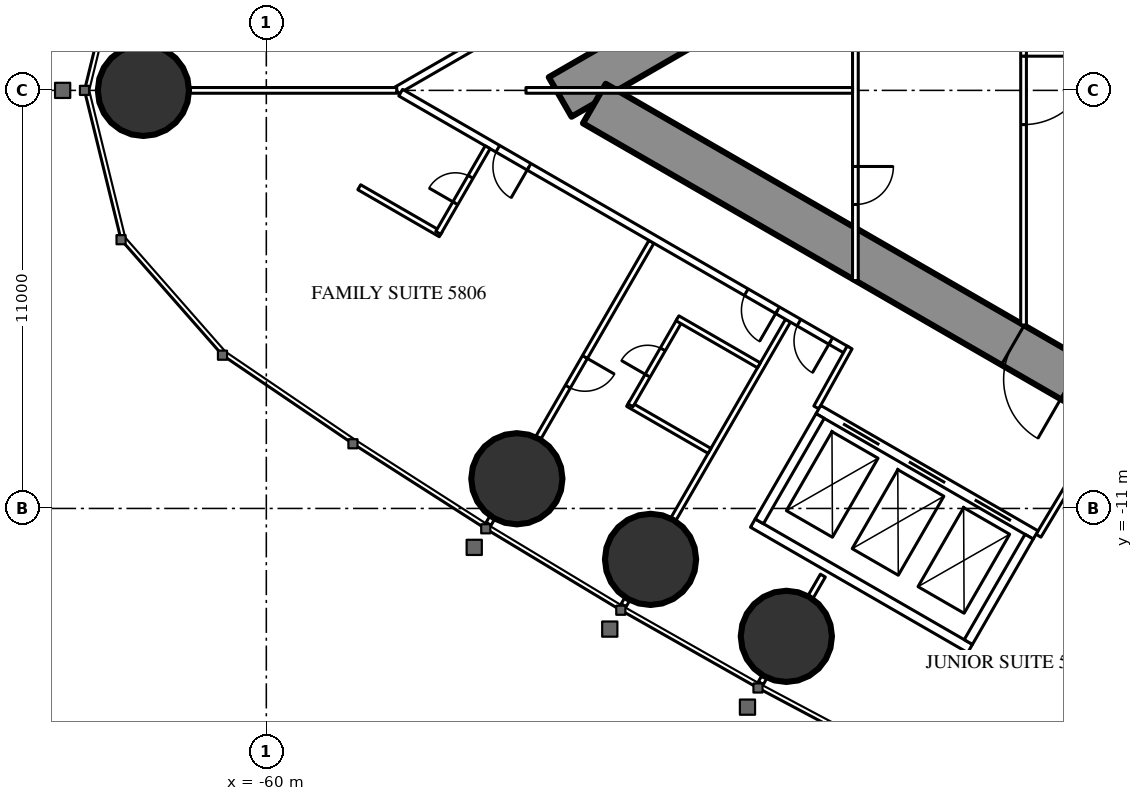
"""IFC4 building model, lengths in metres.
Left out: names, types, materials, properties, quantities, classifications, styles, units other than length and angle.
Written with IfcOpenShell. Run it as: python <this file> out.ifc"""

import sys

from ifc_helpers import new_model, si_unit, direction, frame, frame_2d, origin, origin_2d, place, context, subcontext, project, spatial, rectangle, circle, extrude, element, fill, save


model = new_model("IFC4")
c1 = context("Model", 3, precision=1e-05, world=origin(), true_north=direction((0.0, 1.0)))
c2 = subcontext(c1, "Body", "Model", "MODEL_VIEW")
j1 = project(units=[si_unit("LENGTHUNIT", "METRE"), si_unit("PLANEANGLEUNIT", "RADIAN")], contexts=[c1])
p1 = place(None, origin())
s1 = spatial("IfcSite", under=j1, at=p1, CompositionType="ELEMENT")
p2 = place(p1, origin())
s2 = spatial("IfcBuilding", under=s1, at=p2, CompositionType="ELEMENT")
p3 = place(p2, frame((0.0, 0.0, 218.9)))
s3 = spatial("IfcBuildingStorey", under=s2, at=p3, CompositionType="ELEMENT", Elevation=218.9)
for number, where, z_axis, x_axis in (
    (1, (-63.234, 0.0, 0.0), (0.0, 0.0, 1.0), (1.0, 0.0, 0.0)),
    (2, (-53.408, -10.219, 0.0), (0.0, 0.0, 1.0), (1.0, 0.0, 0.0)),
    (3, (-49.89, -12.34, 0.0), (0.0, 0.0, 1.0), (1.0, 0.0, 0.0)),
    (4, (-46.317, -14.365, 0.0), (0.0, 0.0, 1.0), (1.0, 0.0, 0.0)),
):
    element("IfcColumn", number, at=place(p3, frame(where, z_axis=z_axis, x_axis=x_axis)), inside=s3, PredefinedType="COLUMN", context=c2, shape_type="SweptSolid", body=[
        extrude(circle(Radius=1.2, at=origin_2d()), origin(), (0.0, 0.0, 1.0), 3.6),
    ])
p4 = place(p3, frame((-27.2, 14.3, 0.0), z_axis=(0.0, 0.0, 1.0), x_axis=(-0.866026593062, -0.499997940104, 0.0)))
e5 = element("IfcWall", 5, at=p4, inside=s3, PredefinedType="SHEAR", context=c2, shape_type="SweptSolid", body=[
    extrude(rectangle(XDim=28.946, YDim=1.2, at=frame_2d((14.473, 0.0))), origin(), (0.0, 0.0, 1.0), 3.6),
])
p5 = place(p4, frame((4.6, 0.0, 0.0)))
e6 = element("IfcOpeningElement", 6, at=p5, cuts=e5, PredefinedType="OPENING", context=c2, shape_type="SweptSolid", body=[
    extrude(rectangle(XDim=1.0, YDim=2.2, at=frame_2d((0.5, 1.1))), frame((0.0, 0.61, 0.0), z_axis=(0.0, -1.0, 0.0), x_axis=(1.0, 0.0, 0.0)), (0.0, 0.0, 1.0), 1.22),
])
p6 = place(p4, frame((13.395, 0.0, 0.0)))
e7 = element("IfcOpeningElement", 7, at=p6, cuts=e5, PredefinedType="OPENING", context=c2, shape_type="SweptSolid", body=[
    extrude(rectangle(XDim=1.8, YDim=2.2, at=frame_2d((0.9, 1.1))), frame((0.0, 0.61, 0.0), z_axis=(0.0, -1.0, 0.0), x_axis=(1.0, 0.0, 0.0)), (0.0, 0.0, 1.0), 1.22),
])
p7 = place(p3, frame((-27.2, -14.3, 0.0), z_axis=(0.0, 0.0, 1.0), x_axis=(-0.866024021859, 0.500002393557, 0.0)))
e8 = element("IfcWall", 8, at=p7, inside=s3, PredefinedType="SHEAR", context=c2, shape_type="SweptSolid", body=[
    extrude(rectangle(XDim=27.907, YDim=1.2, at=frame_2d((13.954, 0.0))), origin(), (0.0, 0.0, 1.0), 3.6),
])
p8 = place(p7, frame((4.6, 0.0, 0.0)))
e9 = element("IfcOpeningElement", 9, at=p8, cuts=e8, PredefinedType="OPENING", context=c2, shape_type="SweptSolid", body=[
    extrude(rectangle(XDim=1.0, YDim=2.2, at=frame_2d((0.5, 1.1))), frame((0.0, 0.61, 0.0), z_axis=(0.0, -1.0, 0.0), x_axis=(1.0, 0.0, 0.0)), (0.0, 0.0, 1.0), 1.22),
])
p9 = place(p7, frame((13.395, 0.0, 0.0)))
e10 = element("IfcOpeningElement", 10, at=p9, cuts=e8, PredefinedType="OPENING", context=c2, shape_type="SweptSolid", body=[
    extrude(rectangle(XDim=1.8, YDim=2.2, at=frame_2d((0.9, 1.1))), frame((0.0, 0.61, 0.0), z_axis=(0.0, -1.0, 0.0), x_axis=(1.0, 0.0, 0.0)), (0.0, 0.0, 1.0), 1.22),
])
p10 = place(p3, frame((-28.737, 16.068, 0.0), z_axis=(0.0, 0.0, 1.0), x_axis=(-0.866026057212, -0.499998868229, 0.0)))
e11 = element("IfcWall", 11, at=p10, inside=s3, PredefinedType="PARTITIONING", context=c2, shape_type="SweptSolid", body=[
    extrude(rectangle(XDim=32.137, YDim=0.2, at=frame_2d((16.068, 0.0))), origin(), (0.0, 0.0, 1.0), 3.35),
])
p11 = place(p10, frame((1.08, 0.0, 0.0)))
e12 = element("IfcOpeningElement", 12, at=p11, cuts=e11, PredefinedType="OPENING", context=c2, shape_type="SweptSolid", body=[
    extrude(rectangle(XDim=1.8, YDim=2.03, at=frame_2d((0.9, 1.015))), frame((0.0, 0.11, 0.0), z_axis=(0.0, -1.0, 0.0), x_axis=(1.0, 0.0, 0.0)), (0.0, 0.0, 1.0), 0.22),
])
p12 = place(p10, frame((6.86, 0.0, 0.0)))
e13 = element("IfcOpeningElement", 13, at=p12, cuts=e11, PredefinedType="OPENING", context=c2, shape_type="SweptSolid", body=[
    extrude(rectangle(XDim=1.0, YDim=2.2, at=frame_2d((0.5, 1.1))), frame((0.0, 0.11, 0.0), z_axis=(0.0, -1.0, 0.0), x_axis=(1.0, 0.0, 0.0)), (0.0, 0.0, 1.0), 0.22),
])
p13 = place(p10, frame((16.418, 0.0, 0.0)))
e14 = element("IfcOpeningElement", 14, at=p13, cuts=e11, PredefinedType="OPENING", context=c2, shape_type="SweptSolid", body=[
    extrude(rectangle(XDim=0.95, YDim=2.2, at=frame_2d((0.475, 1.1))), frame((0.0, 0.11, 0.0), z_axis=(0.0, -1.0, 0.0), x_axis=(1.0, 0.0, 0.0)), (0.0, 0.0, 1.0), 0.22),
])
p14 = place(p10, frame((20.567, 0.0, 0.0)))
e15 = element("IfcOpeningElement", 15, at=p14, cuts=e11, PredefinedType="OPENING", context=c2, shape_type="SweptSolid", body=[
    extrude(rectangle(XDim=0.95, YDim=2.2, at=frame_2d((0.475, 1.1))), frame((0.0, 0.11, 0.0), z_axis=(0.0, -1.0, 0.0), x_axis=(1.0, 0.0, 0.0)), (0.0, 0.0, 1.0), 0.22),
])
p15 = place(p10, frame((27.065, 0.0, 0.0)))
e16 = element("IfcOpeningElement", 16, at=p15, cuts=e11, PredefinedType="OPENING", context=c2, shape_type="SweptSolid", body=[
    extrude(rectangle(XDim=0.95, YDim=2.2, at=frame_2d((0.475, 1.1))), frame((0.0, 0.11, 0.0), z_axis=(0.0, -1.0, 0.0), x_axis=(1.0, 0.0, 0.0)), (0.0, 0.0, 1.0), 0.22),
])
p16 = place(p3, frame((-46.898, -15.439, 0.0), z_axis=(0.0, 0.0, 1.0), x_axis=(-0.500232303069, -0.865891241997, 0.0)))
e17 = element("IfcWall", 17, at=p16, inside=s3, PredefinedType="PARTITIONING", context=c2, shape_type="SweptSolid", body=[
    extrude(rectangle(XDim=0.18, YDim=0.15, at=frame_2d((0.09, 0.0))), origin(), (0.0, 0.0, 1.0), 2.45),
])
p17 = place(p3, frame((-46.274, -6.059, 0.0), z_axis=(0.0, 0.0, 1.0), x_axis=(-0.500020471368, -0.866013584312, 0.0)))
e18 = element("IfcWall", 18, at=p17, inside=s3, PredefinedType="PARTITIONING", context=c2, shape_type="SweptSolid", body=[
    extrude(rectangle(XDim=6.028, YDim=0.15, at=frame_2d((3.014, 0.0))), origin(), (0.0, 0.0, 1.0), 2.45),
])
p18 = place(p3, frame((-50.508, -13.392, 0.0), z_axis=(0.0, 0.0, 1.0), x_axis=(-0.499644091975, -0.866230789891, 0.0)))
e19 = element("IfcWall", 19, at=p18, inside=s3, PredefinedType="PARTITIONING", context=c2, shape_type="SweptSolid", body=[
    extrude(rectangle(XDim=0.18, YDim=0.15, at=frame_2d((0.09, 0.0))), origin(), (0.0, 0.0, 1.0), 2.45),
])
p19 = place(p3, frame((-49.866, -3.985, 0.0), z_axis=(0.0, 0.0, 1.0), x_axis=(-0.500000694566, -0.866025002776, 0.0)))
e20 = element("IfcWall", 20, at=p19, inside=s3, PredefinedType="PARTITIONING", context=c2, shape_type="SweptSolid", body=[
    extrude(rectangle(XDim=5.95, YDim=0.15, at=frame_2d((2.975, 0.0))), origin(), (0.0, 0.0, 1.0), 2.45),
])
p20 = place(p19, frame((3.5, 0.0, 0.0)))
e21 = element("IfcOpeningElement", 21, at=p20, cuts=e20, PredefinedType="OPENING", context=c2, shape_type="SweptSolid", body=[
    extrude(rectangle(XDim=0.9, YDim=2.2, at=frame_2d((0.45, 1.1))), frame((0.0, 0.085, 0.0), z_axis=(0.0, -1.0, 0.0), x_axis=(1.0, 0.0, 0.0)), (0.0, 0.0, 1.0), 0.17),
])
p21 = place(p3, frame((-54.061, -11.25, 0.0), z_axis=(0.0, 0.0, 1.0), x_axis=(-0.500391173478, -0.865799441849, 0.0)))
e22 = element("IfcWall", 22, at=p21, inside=s3, PredefinedType="PARTITIONING", context=c2, shape_type="SweptSolid", body=[
    extrude(rectangle(XDim=0.179, YDim=0.15, at=frame_2d((0.089, 0.0))), origin(), (0.0, 0.0, 1.0), 2.45),
])
p22 = place(p3, frame((-56.568, 0.0, 0.0), z_axis=(0.0, 0.0, 1.0), x_axis=(-1.0, 0.0, 0.0)))
e23 = element("IfcWall", 23, at=p22, inside=s3, PredefinedType="PARTITIONING", context=c2, shape_type="SweptSolid", body=[
    extrude(rectangle(XDim=5.446, YDim=0.15, at=frame_2d((2.723, 0.0))), origin(), (0.0, 0.0, 1.0), 2.45),
])
p23 = place(p3, frame((-45.356, -12.767, 0.0), z_axis=(0.0, 0.0, 1.0), x_axis=(-0.499886366516, -0.866091000168, 0.0)))
e24 = element("IfcWall", 24, at=p23, inside=s3, PredefinedType="PARTITIONING", context=c2, shape_type="SweptSolid", body=[
    extrude(rectangle(XDim=0.645, YDim=0.15, at=frame_2d((0.322, 0.0))), origin(), (0.0, 0.0, 1.0), 3.35),
])
p24 = place(p3, frame((-44.715, -6.844, 0.0), z_axis=(0.0, 0.0, 1.0), x_axis=(-0.866025261224, 0.500000246922, 0.0)))
e25 = element("IfcWall", 25, at=p24, inside=s3, PredefinedType="PARTITIONING", context=c2, shape_type="SweptSolid", body=[
    extrude(rectangle(XDim=13.567, YDim=0.2, at=frame_2d((6.783, 0.0))), origin(), (0.0, 0.0, 1.0), 3.35),
])
p25 = place(p24, frame((9.667, 0.0, 0.0)))
e26 = element("IfcOpeningElement", 26, at=p25, cuts=e25, PredefinedType="OPENING", context=c2, shape_type="SweptSolid", body=[
    extrude(rectangle(XDim=0.95, YDim=2.2, at=frame_2d((0.475, 1.1))), frame((0.0, 0.11, 0.0), z_axis=(0.0, -1.0, 0.0), x_axis=(1.0, 0.0, 0.0)), (0.0, 0.0, 1.0), 0.22),
])
p26 = place(p24, frame((2.117, 0.0, 0.0)))
e27 = element("IfcOpeningElement", 27, at=p26, cuts=e25, PredefinedType="OPENING", context=c2, shape_type="SweptSolid", body=[
    extrude(rectangle(XDim=0.95, YDim=2.2, at=frame_2d((0.475, 1.1))), frame((0.0, 0.11, 0.0), z_axis=(0.0, -1.0, 0.0), x_axis=(1.0, 0.0, 0.0)), (0.0, 0.0, 1.0), 0.22),
])
p27 = place(p24, frame((0.5, 0.0, 0.0)))
e28 = element("IfcOpeningElement", 28, at=p27, cuts=e25, PredefinedType="OPENING", context=c2, shape_type="SweptSolid", body=[
    extrude(rectangle(XDim=0.967, YDim=2.2, at=frame_2d((0.483, 1.1))), frame((0.0, 0.11, 0.0), z_axis=(0.0, -1.0, 0.0), x_axis=(1.0, 0.0, 0.0)), (0.0, 0.0, 1.0), 0.22),
])
for number, where, z_axis, x_axis in (
    (29, (-39.683, -11.718, 0.0), (0.0, 0.0, 1.0), (0.514, 0.858, 0.0)),
    (30, (-44.652, -6.764, 0.0), (0.0, 0.0, 1.0), (-0.485, -0.874, 0.0)),
):
    element("IfcWall", number, at=place(p3, frame(where, z_axis=z_axis, x_axis=x_axis)), inside=s3, PredefinedType="PARTITIONING", context=c2, shape_type="SweptSolid", body=[
        extrude(rectangle(XDim=1.805, YDim=0.15, at=frame_2d((0.903, 0.0))), origin(), (0.0, 0.0, 1.0), 3.35),
    ])
p28 = place(p3, frame((-55.411, -3.786, 0.0), z_axis=(0.0, 0.0, 1.0), x_axis=(-0.866006523861, 0.500032699561, 0.0)))
e31 = element("IfcWall", 31, at=p28, inside=s3, PredefinedType="PARTITIONING", context=c2, shape_type="SweptSolid", body=[
    extrude(rectangle(XDim=2.475, YDim=0.15, at=frame_2d((1.237, 0.0))), origin(), (0.0, 0.0, 1.0), 3.35),
])
p29 = place(p3, frame((-54.176, -1.497, 0.0), z_axis=(0.0, 0.0, 1.0), x_axis=(-0.500006934395, -0.866021400173, 0.0)))
e32 = element("IfcWall", 32, at=p29, inside=s3, PredefinedType="PARTITIONING", context=c2, shape_type="SweptSolid", body=[
    extrude(rectangle(XDim=2.6, YDim=0.15, at=frame_2d((1.3, 0.0))), origin(), (0.0, 0.0, 1.0), 3.35),
])
p30 = place(p29, frame((0.9, 0.0, 0.0)))
e33 = element("IfcOpeningElement", 33, at=p30, cuts=e32, PredefinedType="OPENING", context=c2, shape_type="SweptSolid", body=[
    extrude(rectangle(XDim=0.8, YDim=2.2, at=frame_2d((0.4, 1.1))), frame((0.0, 0.085, 0.0), z_axis=(0.0, -1.0, 0.0), x_axis=(1.0, 0.0, 0.0)), (0.0, 0.0, 1.0), 0.17),
])
p31 = place(p3, frame((-48.339, -9.486, 0.0), z_axis=(0.0, 0.0, 1.0), x_axis=(-0.866006523861, 0.500032699561, 0.0)))
e34 = element("IfcWall", 34, at=p31, inside=s3, PredefinedType="PARTITIONING", context=c2, shape_type="SweptSolid", body=[
    extrude(rectangle(XDim=2.475, YDim=0.15, at=frame_2d((1.237, 0.0))), origin(), (0.0, 0.0, 1.0), 3.35),
])
p32 = place(p3, frame((-49.117, -6.034, 0.0), z_axis=(0.0, 0.0, 1.0), x_axis=(-0.500006934395, -0.866021400173, 0.0)))
e35 = element("IfcWall", 35, at=p32, inside=s3, PredefinedType="PARTITIONING", context=c2, shape_type="SweptSolid", body=[
    extrude(rectangle(XDim=2.6, YDim=0.15, at=frame_2d((1.3, 0.0))), origin(), (0.0, 0.0, 1.0), 3.35),
])
p33 = place(p32, frame((0.9, 0.0, 0.0)))
e36 = element("IfcOpeningElement", 36, at=p33, cuts=e35, PredefinedType="OPENING", context=c2, shape_type="SweptSolid", body=[
    extrude(rectangle(XDim=0.8, YDim=2.2, at=frame_2d((0.4, 1.1))), frame((0.0, 0.085, 0.0), z_axis=(0.0, -1.0, 0.0), x_axis=(1.0, 0.0, 0.0)), (0.0, 0.0, 1.0), 0.17),
])
p34 = place(p3, frame((-47.039, -7.234, 0.0), z_axis=(0.0, 0.0, 1.0), x_axis=(-0.866073894602, 0.499916002032, 0.0)))
e37 = element("IfcWall", 37, at=p34, inside=s3, PredefinedType="PARTITIONING", context=c2, shape_type="SweptSolid", body=[
    extrude(rectangle(XDim=2.475, YDim=0.15, at=frame_2d((1.238, 0.0))), origin(), (0.0, 0.0, 1.0), 2.5),
])
p35 = place(p3, frame((-40.075, 6.174, 0.0), z_axis=(0.0, 0.0, 1.0), x_axis=(0.0, -1.0, 0.0)))
e38 = element("IfcWall", 38, at=p35, inside=s3, PredefinedType="PARTITIONING", context=c2, shape_type="SweptSolid", body=[
    extrude(rectangle(XDim=12.348, YDim=0.15, at=frame_2d((6.174, 0.0))), origin(), (0.0, 0.0, 1.0), 3.35),
])
p36 = place(p35, frame((5.274, 0.0, 0.0)))
e39 = element("IfcOpeningElement", 39, at=p36, cuts=e38, PredefinedType="OPENING", context=c2, shape_type="SweptSolid", body=[
    extrude(rectangle(XDim=1.8, YDim=2.2, at=frame_2d((0.9, 1.1))), frame((0.0, 0.085, 0.0), z_axis=(0.0, -1.0, 0.0), x_axis=(1.0, 0.0, 0.0)), (0.0, 0.0, 1.0), 0.17),
])
p37 = place(p3, frame((-44.5, 5.005, 0.0), z_axis=(0.0, 0.0, 1.0), x_axis=(0.0, -1.0, 0.0)))
e40 = element("IfcWall", 40, at=p37, inside=s3, PredefinedType="PARTITIONING", context=c2, shape_type="SweptSolid", body=[
    extrude(rectangle(XDim=10.009, YDim=0.15, at=frame_2d((5.005, 0.0))), origin(), (0.0, 0.0, 1.0), 2.5),
])
p38 = place(p37, frame((2.002, 0.0, 0.0)))
e41 = element("IfcOpeningElement", 41, at=p38, cuts=e40, PredefinedType="OPENING", context=c2, shape_type="SweptSolid", body=[
    extrude(rectangle(XDim=1.0, YDim=2.2, at=frame_2d((0.5, 1.1))), frame((0.0, 0.085, 0.0), z_axis=(0.0, -1.0, 0.0), x_axis=(1.0, 0.0, 0.0)), (0.0, 0.0, 1.0), 0.17),
])
p39 = place(p37, frame((7.007, 0.0, 0.0)))
e42 = element("IfcOpeningElement", 42, at=p39, cuts=e40, PredefinedType="OPENING", context=c2, shape_type="SweptSolid", body=[
    extrude(rectangle(XDim=1.0, YDim=2.2, at=frame_2d((0.5, 1.1))), frame((0.0, 0.085, 0.0), z_axis=(0.0, -1.0, 0.0), x_axis=(1.0, 0.0, 0.0)), (0.0, 0.0, 1.0), 0.17),
])
p40 = place(p3, frame((-44.575, 0.0, 0.0), z_axis=(0.0, 0.0, 1.0), x_axis=(-1.0, 0.0, 0.0)))
e43 = element("IfcWall", 43, at=p40, inside=s3, PredefinedType="PARTITIONING", context=c2, shape_type="SweptSolid", body=[
    extrude(rectangle(XDim=8.593, YDim=0.15, at=frame_2d((4.297, 0.0))), origin(), (0.0, 0.0, 1.0), 2.45),
])
p41 = place(p3, frame((-39.758, -11.697, 0.0), z_axis=(0.0, 0.0, 1.0), x_axis=(-0.866024194504, 0.500002094529, 0.0)))
e44 = element("IfcWall", 44, at=p41, inside=s3, PredefinedType="PARTITIONING", context=c2, shape_type="SweptSolid", body=[
    extrude(rectangle(XDim=6.6, YDim=0.25, at=frame_2d((3.3, 0.0))), origin(), (0.0, 0.0, 1.0), 3.35),
])
p42 = place(p41, frame((0.75, 0.0, 0.0)))
e45 = element("IfcOpeningElement", 45, at=p42, cuts=e44, PredefinedType="OPENING", context=c2, shape_type="SweptSolid", body=[
    extrude(rectangle(XDim=1.1, YDim=2.2, at=frame_2d((0.55, 1.1))), frame((0.0, 0.135, 0.0), z_axis=(0.0, -1.0, 0.0), x_axis=(1.0, 0.0, 0.0)), (0.0, 0.0, 1.0), 0.27),
])
p43 = place(p41, frame((2.75, 0.0, 0.0)))
e46 = element("IfcOpeningElement", 46, at=p43, cuts=e44, PredefinedType="OPENING", context=c2, shape_type="SweptSolid", body=[
    extrude(rectangle(XDim=1.1, YDim=2.2, at=frame_2d((0.55, 1.1))), frame((0.0, 0.135, 0.0), z_axis=(0.0, -1.0, 0.0), x_axis=(1.0, 0.0, 0.0)), (0.0, 0.0, 1.0), 0.27),
])
p44 = place(p41, frame((4.75, 0.0, 0.0)))
e47 = element("IfcOpeningElement", 47, at=p44, cuts=e44, PredefinedType="OPENING", context=c2, shape_type="SweptSolid", body=[
    extrude(rectangle(XDim=1.1, YDim=2.2, at=frame_2d((0.55, 1.1))), frame((0.0, 0.135, 0.0), z_axis=(0.0, -1.0, 0.0), x_axis=(1.0, 0.0, 0.0)), (0.0, 0.0, 1.0), 0.27),
])
p45 = place(p3, frame((-41.482, -14.686, 0.0), z_axis=(0.0, 0.0, 1.0), x_axis=(-0.86603344179, 0.499986077507, 0.0)))
e48 = element("IfcWall", 48, at=p45, inside=s3, PredefinedType="PARTITIONING", context=c2, shape_type="SweptSolid", body=[
    extrude(rectangle(XDim=6.6, YDim=0.25, at=frame_2d((3.3, 0.0))), origin(), (0.0, 0.0, 1.0), 3.35),
])
for number, where, z_axis, x_axis in (
    (49, (-39.928, -11.743, 0.0), (0.0, 0.0, 1.0), (-0.5, -0.866, 0.0)),
    (50, (-45.428, -8.568, 0.0), (0.0, 0.0, 1.0), (-0.5, -0.866, 0.0)),
):
    element("IfcWall", number, at=place(p3, frame(where, z_axis=z_axis, x_axis=x_axis)), inside=s3, PredefinedType="PARTITIONING", context=c2, shape_type="SweptSolid", body=[
        extrude(rectangle(XDim=3.201, YDim=0.25, at=frame_2d((1.6, 0.0))), origin(), (0.0, 0.0, 1.0), 3.35),
    ])
p46 = place(p30, origin())
e51 = element("IfcDoor", 51, at=p46, inside=s3, OperationType="SINGLE_SWING_RIGHT", PredefinedType="DOOR", context=c2, shape_type="SweptSolid", body=[
    extrude(rectangle(XDim=0.8, YDim=2.2, at=frame_2d((0.4, 1.1))), frame((0.0, 0.025, 0.0), z_axis=(0.0, -1.0, 0.0), x_axis=(1.0, 0.0, 0.0)), (0.0, 0.0, 1.0), 0.05),
])
fill(e33, e51)
p47 = place(p25, origin())
e52 = element("IfcDoor", 52, at=p47, inside=s3, OperationType="SINGLE_SWING_LEFT", PredefinedType="DOOR", context=c2, shape_type="SweptSolid", body=[
    extrude(rectangle(XDim=0.95, YDim=2.2, at=frame_2d((0.475, 1.1))), frame((0.0, 0.025, 0.0), z_axis=(0.0, -1.0, 0.0), x_axis=(1.0, 0.0, 0.0)), (0.0, 0.0, 1.0), 0.05),
])
fill(e26, e52)
p48 = place(p33, origin())
e53 = element("IfcDoor", 53, at=p48, inside=s3, OperationType="SINGLE_SWING_RIGHT", PredefinedType="DOOR", context=c2, shape_type="SweptSolid", body=[
    extrude(rectangle(XDim=0.8, YDim=2.2, at=frame_2d((0.4, 1.1))), frame((0.0, 0.025, 0.0), z_axis=(0.0, -1.0, 0.0), x_axis=(1.0, 0.0, 0.0)), (0.0, 0.0, 1.0), 0.05),
])
fill(e36, e53)
p49 = place(p26, origin())
e54 = element("IfcDoor", 54, at=p49, inside=s3, OperationType="SINGLE_SWING_LEFT", PredefinedType="DOOR", context=c2, shape_type="SweptSolid", body=[
    extrude(rectangle(XDim=0.95, YDim=2.2, at=frame_2d((0.475, 1.1))), frame((0.0, 0.025, 0.0), z_axis=(0.0, -1.0, 0.0), x_axis=(1.0, 0.0, 0.0)), (0.0, 0.0, 1.0), 0.05),
])
fill(e27, e54)
p50 = place(p27, origin())
e55 = element("IfcDoor", 55, at=p50, inside=s3, OperationType="SINGLE_SWING_LEFT", PredefinedType="DOOR", context=c2, shape_type="SweptSolid", body=[
    extrude(rectangle(XDim=0.967, YDim=2.2, at=frame_2d((0.483, 1.1))), frame((0.0, 0.025, 0.0), z_axis=(0.0, -1.0, 0.0), x_axis=(1.0, 0.0, 0.0)), (0.0, 0.0, 1.0), 0.05),
])
fill(e28, e55)
p51 = place(p20, origin())
e56 = element("IfcDoor", 56, at=p51, inside=s3, OperationType="SINGLE_SWING_LEFT", PredefinedType="DOOR", context=c2, shape_type="SweptSolid", body=[
    extrude(rectangle(XDim=0.9, YDim=2.2, at=frame_2d((0.45, 1.1))), frame((0.0, 0.025, 0.0), z_axis=(0.0, -1.0, 0.0), x_axis=(1.0, 0.0, 0.0)), (0.0, 0.0, 1.0), 0.05),
])
fill(e21, e56)
p52 = place(p36, origin())
e57 = element("IfcDoor", 57, at=p52, inside=s3, OperationType="DOUBLE_DOOR_SINGLE_SWING", PredefinedType="DOOR", context=c2, shape_type="SweptSolid", body=[
    extrude(rectangle(XDim=1.8, YDim=2.2, at=frame_2d((0.9, 1.1))), frame((0.0, 0.025, 0.0), z_axis=(0.0, -1.0, 0.0), x_axis=(1.0, 0.0, 0.0)), (0.0, 0.0, 1.0), 0.05),
])
fill(e39, e57)
p53 = place(p39, origin())
e58 = element("IfcDoor", 58, at=p53, inside=s3, OperationType="SINGLE_SWING_LEFT", PredefinedType="DOOR", context=c2, shape_type="SweptSolid", body=[
    extrude(rectangle(XDim=1.0, YDim=2.2, at=frame_2d((0.5, 1.1))), frame((0.0, 0.025, 0.0), z_axis=(0.0, -1.0, 0.0), x_axis=(1.0, 0.0, 0.0)), (0.0, 0.0, 1.0), 0.05),
])
fill(e42, e58)
p54 = place(p9, origin())
e59 = element("IfcDoor", 59, at=p54, inside=s3, OperationType="DOUBLE_DOOR_SINGLE_SWING", PredefinedType="DOOR", context=c2, shape_type="SweptSolid", body=[
    extrude(rectangle(XDim=1.8, YDim=2.2, at=frame_2d((0.9, 1.1))), frame((0.0, 0.025, 0.0), z_axis=(0.0, -1.0, 0.0), x_axis=(1.0, 0.0, 0.0)), (0.0, 0.0, 1.0), 0.05),
])
fill(e10, e59)
p55 = place(p42, origin())
e60 = element("IfcDoor", 60, at=p55, inside=s3, OperationType="DOUBLE_DOOR_SLIDING", PredefinedType="USERDEFINED", context=c2, shape_type="SweptSolid", body=[
    extrude(rectangle(XDim=1.1, YDim=2.2, at=frame_2d((0.55, 1.1))), frame((0.0, 0.025, 0.0), z_axis=(0.0, -1.0, 0.0), x_axis=(1.0, 0.0, 0.0)), (0.0, 0.0, 1.0), 0.05),
])
fill(e45, e60)
p56 = place(p43, origin())
e61 = element("IfcDoor", 61, at=p56, inside=s3, OperationType="DOUBLE_DOOR_SLIDING", PredefinedType="USERDEFINED", context=c2, shape_type="SweptSolid", body=[
    extrude(rectangle(XDim=1.1, YDim=2.2, at=frame_2d((0.55, 1.1))), frame((0.0, 0.025, 0.0), z_axis=(0.0, -1.0, 0.0), x_axis=(1.0, 0.0, 0.0)), (0.0, 0.0, 1.0), 0.05),
])
fill(e46, e61)
p57 = place(p44, origin())
e62 = element("IfcDoor", 62, at=p57, inside=s3, OperationType="DOUBLE_DOOR_SLIDING", PredefinedType="USERDEFINED", context=c2, shape_type="SweptSolid", body=[
    extrude(rectangle(XDim=1.1, YDim=2.2, at=frame_2d((0.55, 1.1))), frame((0.0, 0.025, 0.0), z_axis=(0.0, -1.0, 0.0), x_axis=(1.0, 0.0, 0.0)), (0.0, 0.0, 1.0), 0.05),
])
fill(e47, e62)
save(model, sys.argv[1])
